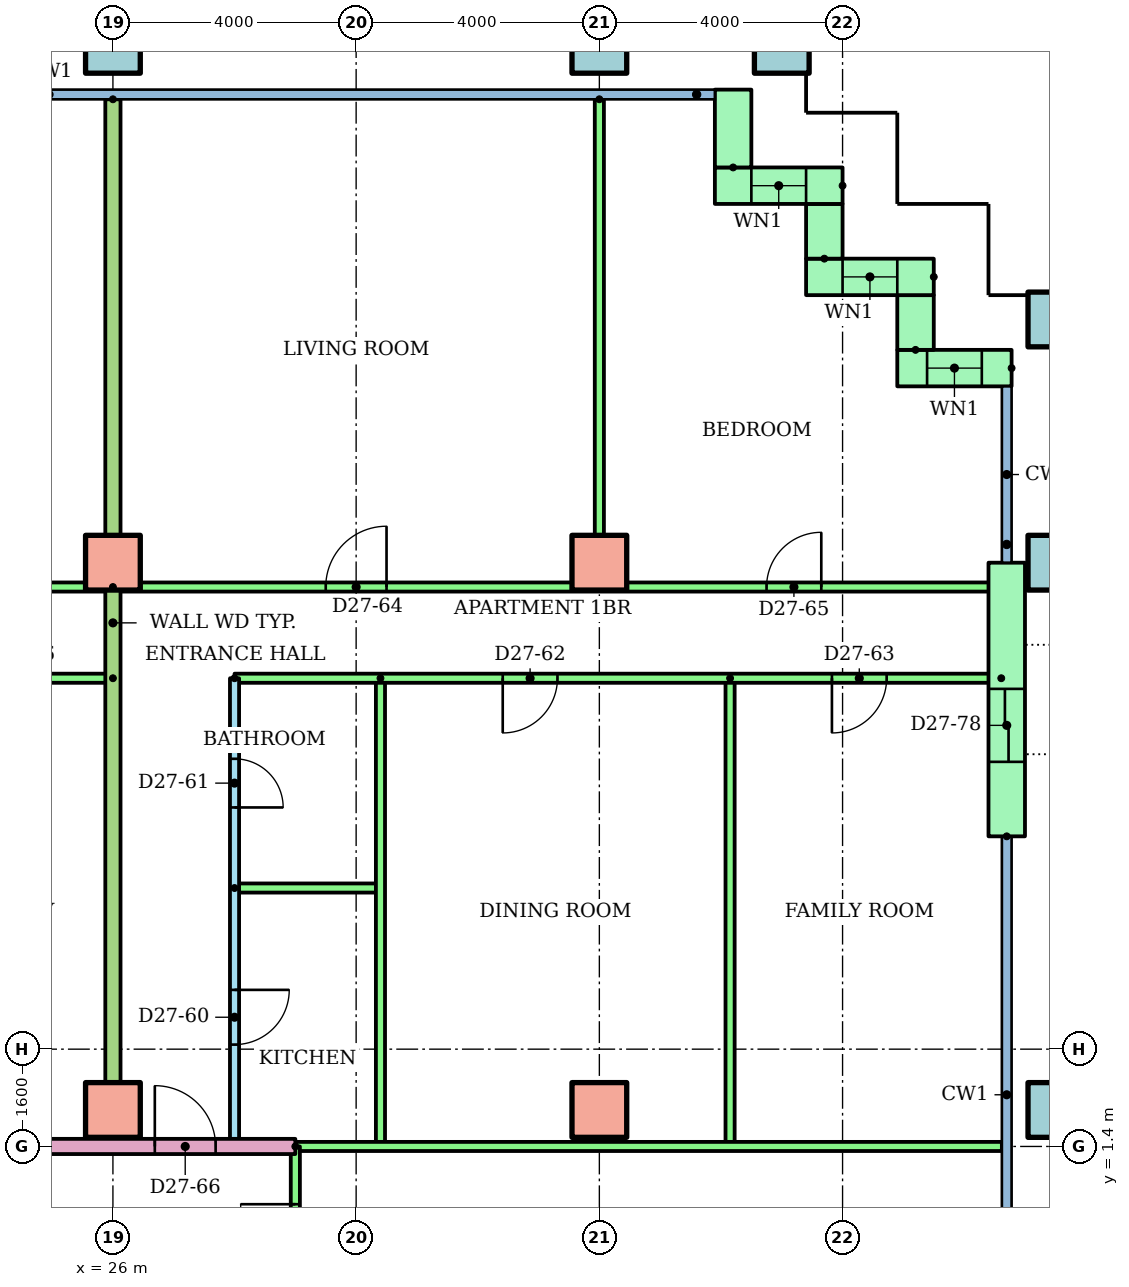
"""IFC4 building model, lengths in metres.
Left out: names, types, materials, properties, quantities, classifications, styles, units other than length and angle.
Written with IfcOpenShell. Run it as: python <this file> out.ifc"""

import sys

from ifc_helpers import new_model, si_unit, direction, frame, frame_2d, origin, origin_2d, place, context, subcontext, project, spatial, rectangle, hollow_rectangle, extrude, element, fill, save


model = new_model("IFC4")
c1 = context("Model", 3, precision=1e-05, world=origin(), true_north=direction((0.0, 1.0)))
c2 = subcontext(c1, "Body", "Model", "MODEL_VIEW")
j1 = project(units=[si_unit("LENGTHUNIT", "METRE"), si_unit("PLANEANGLEUNIT", "RADIAN")], contexts=[c1])
p1 = place(None, origin())
s1 = spatial("IfcSite", under=j1, at=p1, CompositionType="ELEMENT")
p2 = place(p1, origin())
s2 = spatial("IfcBuilding", under=s1, at=p2, CompositionType="ELEMENT")
p3 = place(p2, frame((0.0, 0.0, 103.1)))
s3 = spatial("IfcBuildingStorey", under=s2, at=p3, CompositionType="ELEMENT", Elevation=103.1)
for number, where in (
    (1, (26.0, 2.0, 0.0)),
    (2, (34.0, 2.0, 0.0)),
):
    element("IfcColumn", number, at=place(p3, frame(where)), inside=s3, PredefinedType="COLUMN", context=c2, shape_type="SweptSolid", body=[
        extrude(rectangle(XDim=0.9, YDim=0.9, at=origin_2d()), origin(), (0.0, 0.0, 1.0), 3.2),
    ])
p4 = place(p3, frame((41.5, 2.0, 0.0)))
e3 = element("IfcColumn", 3, at=p4, inside=s3, PredefinedType="COLUMN", context=c2, shape_type="SweptSolid", body=[
    extrude(hollow_rectangle(XDim=0.9, YDim=0.9, WallThickness=0.045, at=origin_2d()), origin(), (0.0, 0.0, 1.0), 3.2),
])
for number, where in (
    (4, (26.0, 11.0, 0.0)),
    (5, (34.0, 11.0, 0.0)),
):
    element("IfcColumn", number, at=place(p3, frame(where)), inside=s3, PredefinedType="COLUMN", context=c2, shape_type="SweptSolid", body=[
        extrude(rectangle(XDim=0.9, YDim=0.9, at=origin_2d()), origin(), (0.0, 0.0, 1.0), 3.2),
    ])
for number, where in (
    (6, (41.5, 11.0, 0.0)),
    (7, (41.5, 15.0, 0.0)),
    (8, (26.0, 19.5, 0.0)),
    (9, (34.0, 19.5, 0.0)),
    (10, (37.0, 19.5, 0.0)),
):
    element("IfcColumn", number, at=place(p3, frame(where)), inside=s3, PredefinedType="COLUMN", context=c2, shape_type="SweptSolid", body=[
        extrude(hollow_rectangle(XDim=0.9, YDim=0.9, WallThickness=0.045, at=origin_2d()), origin(), (0.0, 0.0, 1.0), 3.2),
    ])
p5 = place(p3, frame((40.78, 14.2, 0.0), z_axis=(0.0, 0.0, 1.0), x_axis=(-1.0, 0.0, 0.0)))
e11 = element("IfcWall", 11, at=p5, inside=s3, PredefinedType="STANDARD", context=c2, shape_type="SweptSolid", body=[
    extrude(rectangle(XDim=1.88, YDim=0.6, at=frame_2d((0.94, 0.0))), origin(), (0.0, 0.0, 1.0), 2.8),
])
p6 = place(p5, frame((0.49, 0.0, 0.9)))
e12 = element("IfcOpeningElement", 12, at=p6, cuts=e11, PredefinedType="OPENING", context=c2, shape_type="SweptSolid", body=[
    extrude(rectangle(XDim=0.9, YDim=1.5, at=frame_2d((0.45, 0.75))), frame((0.0, 0.31, 0.0), z_axis=(0.0, -1.0, 0.0), x_axis=(1.0, 0.0, 0.0)), (0.0, 0.0, 1.0), 0.62),
])
p7 = place(p3, frame((39.2, 14.5, 0.0), z_axis=(0.0, 0.0, 1.0), x_axis=(0.0, 1.0, 0.0)))
e13 = element("IfcWall", 13, at=p7, inside=s3, PredefinedType="STANDARD", context=c2, shape_type="SweptSolid", body=[
    extrude(rectangle(XDim=0.9, YDim=0.6, at=frame_2d((0.45, 0.0))), origin(), (0.0, 0.0, 1.0), 2.8),
])
p8 = place(p3, frame((39.5, 15.7, 0.0), z_axis=(0.0, 0.0, 1.0), x_axis=(-1.0, 0.0, 0.0)))
e14 = element("IfcWall", 14, at=p8, inside=s3, PredefinedType="STANDARD", context=c2, shape_type="SweptSolid", body=[
    extrude(rectangle(XDim=2.1, YDim=0.6, at=frame_2d((1.05, 0.0))), origin(), (0.0, 0.0, 1.0), 2.8),
])
p9 = place(p8, frame((0.6, 0.0, 0.9)))
e15 = element("IfcOpeningElement", 15, at=p9, cuts=e14, PredefinedType="OPENING", context=c2, shape_type="SweptSolid", body=[
    extrude(rectangle(XDim=0.9, YDim=1.5, at=frame_2d((0.45, 0.75))), frame((0.0, 0.31, 0.0), z_axis=(0.0, -1.0, 0.0), x_axis=(1.0, 0.0, 0.0)), (0.0, 0.0, 1.0), 0.62),
])
p10 = place(p3, frame((37.7, 16.0, 0.0), z_axis=(0.0, 0.0, 1.0), x_axis=(0.0, 1.0, 0.0)))
e16 = element("IfcWall", 16, at=p10, inside=s3, PredefinedType="STANDARD", context=c2, shape_type="SweptSolid", body=[
    extrude(rectangle(XDim=0.9, YDim=0.6, at=frame_2d((0.45, 0.0))), origin(), (0.0, 0.0, 1.0), 2.8),
])
p11 = place(p3, frame((38.0, 17.2, 0.0), z_axis=(0.0, 0.0, 1.0), x_axis=(-1.0, 0.0, 0.0)))
e17 = element("IfcWall", 17, at=p11, inside=s3, PredefinedType="STANDARD", context=c2, shape_type="SweptSolid", body=[
    extrude(rectangle(XDim=2.1, YDim=0.6, at=frame_2d((1.05, 0.0))), origin(), (0.0, 0.0, 1.0), 2.8),
])
p12 = place(p11, frame((0.6, 0.0, 0.9)))
e18 = element("IfcOpeningElement", 18, at=p12, cuts=e17, PredefinedType="OPENING", context=c2, shape_type="SweptSolid", body=[
    extrude(rectangle(XDim=0.9, YDim=1.5, at=frame_2d((0.45, 0.75))), frame((0.0, 0.31, 0.0), z_axis=(0.0, -1.0, 0.0), x_axis=(1.0, 0.0, 0.0)), (0.0, 0.0, 1.0), 0.62),
])
p13 = place(p3, frame((36.2, 17.5, 0.0), z_axis=(0.0, 0.0, 1.0), x_axis=(0.0, 1.0, 0.0)))
e19 = element("IfcWall", 19, at=p13, inside=s3, PredefinedType="STANDARD", context=c2, shape_type="SweptSolid", body=[
    extrude(rectangle(XDim=1.28, YDim=0.6, at=frame_2d((0.64, 0.0))), origin(), (0.0, 0.0, 1.0), 2.8),
])
p14 = place(p3, frame((40.7, 6.5, 0.0), z_axis=(0.0, 0.0, 1.0), x_axis=(0.0, 1.0, 0.0)))
e20 = element("IfcWall", 20, at=p14, inside=s3, PredefinedType="STANDARD", context=c2, shape_type="SweptSolid", body=[
    extrude(rectangle(XDim=4.5, YDim=0.6, at=frame_2d((2.25, 0.0))), origin(), (0.0, 0.0, 1.0), 2.8),
])
p15 = place(p14, frame((1.225, 0.0, 0.0)))
e21 = element("IfcOpeningElement", 21, at=p15, cuts=e20, PredefinedType="OPENING", context=c2, shape_type="SweptSolid", body=[
    extrude(rectangle(XDim=1.2, YDim=2.1, at=frame_2d((0.6, 1.05))), frame((0.0, 0.31, 0.0), z_axis=(0.0, -1.0, 0.0), x_axis=(1.0, 0.0, 0.0)), (0.0, 0.0, 1.0), 0.62),
])
p16 = place(p3, frame((26.0, 9.1, 0.0), z_axis=(0.0, 0.0, 1.0), x_axis=(-1.0, 0.0, 0.0)))
e22 = element("IfcWall", 22, at=p16, inside=s3, PredefinedType="PARTITIONING", context=c2, shape_type="SweptSolid", body=[
    extrude(rectangle(XDim=10.0, YDim=0.15, at=frame_2d((5.0, 0.0))), origin(), (0.0, 0.0, 1.0), 2.4),
])
p17 = place(p16, frame((4.9, 0.0, 0.0)))
e23 = element("IfcOpeningElement", 23, at=p17, cuts=e22, PredefinedType="OPENING", context=c2, shape_type="SweptSolid", body=[
    extrude(rectangle(XDim=0.9, YDim=2.1, at=frame_2d((0.45, 1.05))), frame((0.0, 0.085, 0.0), z_axis=(0.0, -1.0, 0.0), x_axis=(1.0, 0.0, 0.0)), (0.0, 0.0, 1.0), 0.17),
])
p18 = place(p16, frame((1.1, 0.0, 0.0)))
e24 = element("IfcOpeningElement", 24, at=p18, cuts=e22, PredefinedType="OPENING", context=c2, shape_type="SweptSolid", body=[
    extrude(rectangle(XDim=0.9, YDim=2.1, at=frame_2d((0.45, 1.05))), frame((0.0, 0.085, 0.0), z_axis=(0.0, -1.0, 0.0), x_axis=(1.0, 0.0, 0.0)), (0.0, 0.0, 1.0), 0.17),
])
p19 = place(p3, frame((14.0, 10.6, 0.0)))
e25 = element("IfcWall", 25, at=p19, inside=s3, PredefinedType="PARTITIONING", context=c2, shape_type="SweptSolid", body=[
    extrude(rectangle(XDim=12.0, YDim=0.15, at=frame_2d((6.0, 0.0))), origin(), (0.0, 0.0, 1.0), 2.4),
])
p20 = place(p19, frame((1.5, 0.0, 0.0)))
e26 = element("IfcOpeningElement", 26, at=p20, cuts=e25, PredefinedType="OPENING", context=c2, shape_type="SweptSolid", body=[
    extrude(rectangle(XDim=1.0, YDim=2.1, at=frame_2d((0.5, 1.05))), frame((0.0, 0.085, 0.0), z_axis=(0.0, -1.0, 0.0), x_axis=(1.0, 0.0, 0.0)), (0.0, 0.0, 1.0), 0.17),
])
p21 = place(p19, frame((7.55, 0.0, 0.0)))
e27 = element("IfcOpeningElement", 27, at=p21, cuts=e25, PredefinedType="OPENING", context=c2, shape_type="SweptSolid", body=[
    extrude(rectangle(XDim=0.9, YDim=2.1, at=frame_2d((0.45, 1.05))), frame((0.0, 0.085, 0.0), z_axis=(0.0, -1.0, 0.0), x_axis=(1.0, 0.0, 0.0)), (0.0, 0.0, 1.0), 0.17),
])
p22 = place(p3, frame((28.0, 9.1, 0.0), z_axis=(0.0, 0.0, 1.0), x_axis=(0.0, -1.0, 0.0)))
e28 = element("IfcWall", 28, at=p22, inside=s3, PredefinedType="PARTITIONING", context=c2, shape_type="SweptSolid", body=[
    extrude(rectangle(XDim=7.7, YDim=0.15, at=frame_2d((3.85, 0.0))), origin(), (0.0, 0.0, 1.0), 2.4),
])
p23 = place(p22, frame((5.125, 0.0, 0.0)))
e29 = element("IfcOpeningElement", 29, at=p23, cuts=e28, PredefinedType="OPENING", context=c2, shape_type="SweptSolid", body=[
    extrude(rectangle(XDim=0.9, YDim=2.1, at=frame_2d((0.45, 1.05))), frame((0.0, 0.085, 0.0), z_axis=(0.0, -1.0, 0.0), x_axis=(1.0, 0.0, 0.0)), (0.0, 0.0, 1.0), 0.17),
])
p24 = place(p22, frame((1.325, 0.0, 0.0)))
e30 = element("IfcOpeningElement", 30, at=p24, cuts=e28, PredefinedType="OPENING", context=c2, shape_type="SweptSolid", body=[
    extrude(rectangle(XDim=0.8, YDim=2.1, at=frame_2d((0.4, 1.05))), frame((0.0, 0.085, 0.0), z_axis=(0.0, -1.0, 0.0), x_axis=(1.0, 0.0, 0.0)), (0.0, 0.0, 1.0), 0.17),
])
p25 = place(p3, frame((28.0, 5.65, 0.0)))
e31 = element("IfcWall", 31, at=p25, inside=s3, PredefinedType="PARTITIONING", context=c2, shape_type="SweptSolid", body=[
    extrude(rectangle(XDim=2.4, YDim=0.15, at=frame_2d((1.2, 0.0))), origin(), (0.0, 0.0, 1.0), 2.4),
])
for number, where, z_axis, x_axis in (
    (32, (30.4, 9.1, 0.0), (0.0, 0.0, 1.0), (0.0, -1.0, 0.0)),
    (33, (36.15, 9.1, 0.0), (0.0, 0.0, 1.0), (0.0, -1.0, 0.0)),
):
    element("IfcWall", number, at=place(p3, frame(where, z_axis=z_axis, x_axis=x_axis)), inside=s3, PredefinedType="PARTITIONING", context=c2, shape_type="SweptSolid", body=[
        extrude(rectangle(XDim=7.7, YDim=0.15, at=frame_2d((3.85, 0.0))), origin(), (0.0, 0.0, 1.0), 2.4),
    ])
p26 = place(p3, frame((40.61, 9.1, 0.0), z_axis=(0.0, 0.0, 1.0), x_axis=(-1.0, 0.0, 0.0)))
e34 = element("IfcWall", 34, at=p26, inside=s3, PredefinedType="PARTITIONING", context=c2, shape_type="SweptSolid", body=[
    extrude(rectangle(XDim=12.61, YDim=0.15, at=frame_2d((6.305, 0.0))), origin(), (0.0, 0.0, 1.0), 2.4),
])
p27 = place(p26, frame((7.299, 0.0, 0.0)))
e35 = element("IfcOpeningElement", 35, at=p27, cuts=e34, PredefinedType="OPENING", context=c2, shape_type="SweptSolid", body=[
    extrude(rectangle(XDim=0.9, YDim=2.1, at=frame_2d((0.45, 1.05))), frame((0.0, 0.085, 0.0), z_axis=(0.0, -1.0, 0.0), x_axis=(1.0, 0.0, 0.0)), (0.0, 0.0, 1.0), 0.17),
])
p28 = place(p26, frame((1.885, 0.0, 0.0)))
e36 = element("IfcOpeningElement", 36, at=p28, cuts=e34, PredefinedType="OPENING", context=c2, shape_type="SweptSolid", body=[
    extrude(rectangle(XDim=0.9, YDim=2.1, at=frame_2d((0.45, 1.05))), frame((0.0, 0.085, 0.0), z_axis=(0.0, -1.0, 0.0), x_axis=(1.0, 0.0, 0.0)), (0.0, 0.0, 1.0), 0.17),
])
p29 = place(p3, frame((26.0, 10.6, 0.0)))
e37 = element("IfcWall", 37, at=p29, inside=s3, PredefinedType="PARTITIONING", context=c2, shape_type="SweptSolid", body=[
    extrude(rectangle(XDim=14.61, YDim=0.15, at=frame_2d((7.305, 0.0))), origin(), (0.0, 0.0, 1.0), 2.4),
])
p30 = place(p29, frame((3.5, 0.0, 0.0)))
e38 = element("IfcOpeningElement", 38, at=p30, cuts=e37, PredefinedType="OPENING", context=c2, shape_type="SweptSolid", body=[
    extrude(rectangle(XDim=1.0, YDim=2.1, at=frame_2d((0.5, 1.05))), frame((0.0, 0.085, 0.0), z_axis=(0.0, -1.0, 0.0), x_axis=(1.0, 0.0, 0.0)), (0.0, 0.0, 1.0), 0.17),
])
p31 = place(p29, frame((10.75, 0.0, 0.0)))
e39 = element("IfcOpeningElement", 39, at=p31, cuts=e37, PredefinedType="OPENING", context=c2, shape_type="SweptSolid", body=[
    extrude(rectangle(XDim=0.9, YDim=2.1, at=frame_2d((0.45, 1.05))), frame((0.0, 0.085, 0.0), z_axis=(0.0, -1.0, 0.0), x_axis=(1.0, 0.0, 0.0)), (0.0, 0.0, 1.0), 0.17),
])
p32 = place(p3, frame((34.0, 18.621, 0.0), z_axis=(0.0, 0.0, 1.0), x_axis=(0.0, -1.0, 0.0)))
e40 = element("IfcWall", 40, at=p32, inside=s3, PredefinedType="PARTITIONING", context=c2, shape_type="SweptSolid", body=[
    extrude(rectangle(XDim=8.021, YDim=0.15, at=frame_2d((4.01, 0.0))), origin(), (0.0, 0.0, 1.0), 2.4),
])
p33 = place(p3, frame((26.0, 18.621, 0.0), z_axis=(0.0, 0.0, 1.0), x_axis=(0.0, -1.0, 0.0)))
e41 = element("IfcWall", 41, at=p33, inside=s3, PredefinedType="PARTITIONING", context=c2, shape_type="SweptSolid", body=[
    extrude(rectangle(XDim=17.221, YDim=0.25, at=frame_2d((8.611, 0.0))), origin(), (0.0, 0.0, 1.0), 2.4),
])
p34 = place(p3, frame((14.0, 1.4, 0.0)))
e42 = element("IfcWall", 42, at=p34, inside=s3, PredefinedType="PARTITIONING", context=c2, shape_type="SweptSolid", body=[
    extrude(rectangle(XDim=15.0, YDim=0.25, at=frame_2d((7.5, 0.0))), origin(), (0.0, 0.0, 1.0), 2.4),
])
p35 = place(p34, frame((0.5, 0.0, 0.0)))
e43 = element("IfcOpeningElement", 43, at=p35, cuts=e42, PredefinedType="OPENING", context=c2, shape_type="SweptSolid", body=[
    extrude(rectangle(XDim=1.0, YDim=2.1, at=frame_2d((0.5, 1.05))), frame((0.0, 0.135, 0.0), z_axis=(0.0, -1.0, 0.0), x_axis=(1.0, 0.0, 0.0)), (0.0, 0.0, 1.0), 0.27),
])
p36 = place(p34, frame((12.689, 0.0, 0.0)))
e44 = element("IfcOpeningElement", 44, at=p36, cuts=e42, PredefinedType="OPENING", context=c2, shape_type="SweptSolid", body=[
    extrude(rectangle(XDim=1.0, YDim=2.1, at=frame_2d((0.5, 1.05))), frame((0.0, 0.135, 0.0), z_axis=(0.0, -1.0, 0.0), x_axis=(1.0, 0.0, 0.0)), (0.0, 0.0, 1.0), 0.27),
])
p37 = place(p3, frame((29.0, 1.4, 0.0)))
e45 = element("IfcWall", 45, at=p37, inside=s3, PredefinedType="PARTITIONING", context=c2, shape_type="SweptSolid", body=[
    extrude(rectangle(XDim=11.62, YDim=0.15, at=frame_2d((5.81, 0.0))), origin(), (0.0, 0.0, 1.0), 2.4),
])
p38 = place(p3, frame((29.0, -1.4, 0.0), z_axis=(0.0, 0.0, 1.0), x_axis=(0.0, 1.0, 0.0)))
e46 = element("IfcWall", 46, at=p38, inside=s3, PredefinedType="PARTITIONING", context=c2, shape_type="SweptSolid", body=[
    extrude(rectangle(XDim=2.8, YDim=0.15, at=frame_2d((1.4, 0.0))), origin(), (0.0, 0.0, 1.0), 2.4),
])
p39 = place(p38, frame((0.95, 0.0, 0.0)))
e47 = element("IfcOpeningElement", 47, at=p39, cuts=e46, PredefinedType="OPENING", context=c2, shape_type="SweptSolid", body=[
    extrude(rectangle(XDim=0.9, YDim=2.1, at=frame_2d((0.45, 1.05))), frame((0.0, 0.085, 0.0), z_axis=(0.0, -1.0, 0.0), x_axis=(1.0, 0.0, 0.0)), (0.0, 0.0, 1.0), 0.17),
])
p40 = place(p6, origin())
e48 = element("IfcWindow", 48, at=p40, inside=s3, PartitioningType="SINGLE_PANEL", PredefinedType="WINDOW", context=c2, shape_type="SweptSolid", body=[
    extrude(rectangle(XDim=0.9, YDim=1.5, at=frame_2d((0.45, 0.75))), frame((0.0, 0.03, 0.0), z_axis=(0.0, -1.0, 0.0), x_axis=(1.0, 0.0, 0.0)), (0.0, 0.0, 1.0), 0.06),
])
fill(e12, e48)
p41 = place(p9, origin())
e49 = element("IfcWindow", 49, at=p41, inside=s3, PartitioningType="SINGLE_PANEL", PredefinedType="WINDOW", context=c2, shape_type="SweptSolid", body=[
    extrude(rectangle(XDim=0.9, YDim=1.5, at=frame_2d((0.45, 0.75))), frame((0.0, 0.03, 0.0), z_axis=(0.0, -1.0, 0.0), x_axis=(1.0, 0.0, 0.0)), (0.0, 0.0, 1.0), 0.06),
])
fill(e15, e49)
p42 = place(p12, origin())
e50 = element("IfcWindow", 50, at=p42, inside=s3, PartitioningType="SINGLE_PANEL", PredefinedType="WINDOW", context=c2, shape_type="SweptSolid", body=[
    extrude(rectangle(XDim=0.9, YDim=1.5, at=frame_2d((0.45, 0.75))), frame((0.0, 0.03, 0.0), z_axis=(0.0, -1.0, 0.0), x_axis=(1.0, 0.0, 0.0)), (0.0, 0.0, 1.0), 0.06),
])
fill(e18, e50)
p43 = place(p23, origin())
e51 = element("IfcDoor", 51, at=p43, inside=s3, OperationType="SINGLE_SWING_LEFT", PredefinedType="DOOR", context=c2, shape_type="SweptSolid", body=[
    extrude(rectangle(XDim=0.9, YDim=2.1, at=frame_2d((0.45, 1.05))), frame((0.0, 0.025, 0.0), z_axis=(0.0, -1.0, 0.0), x_axis=(1.0, 0.0, 0.0)), (0.0, 0.0, 1.0), 0.05),
])
fill(e29, e51)
p44 = place(p24, origin())
e52 = element("IfcDoor", 52, at=p44, inside=s3, OperationType="SINGLE_SWING_RIGHT", PredefinedType="DOOR", context=c2, shape_type="SweptSolid", body=[
    extrude(rectangle(XDim=0.8, YDim=2.1, at=frame_2d((0.4, 1.05))), frame((0.0, 0.025, 0.0), z_axis=(0.0, -1.0, 0.0), x_axis=(1.0, 0.0, 0.0)), (0.0, 0.0, 1.0), 0.05),
])
fill(e30, e52)
p45 = place(p27, origin())
e53 = element("IfcDoor", 53, at=p45, inside=s3, OperationType="SINGLE_SWING_RIGHT", PredefinedType="DOOR", context=c2, shape_type="SweptSolid", body=[
    extrude(rectangle(XDim=0.9, YDim=2.1, at=frame_2d((0.45, 1.05))), frame((0.0, 0.025, 0.0), z_axis=(0.0, -1.0, 0.0), x_axis=(1.0, 0.0, 0.0)), (0.0, 0.0, 1.0), 0.05),
])
fill(e35, e53)
p46 = place(p28, origin())
e54 = element("IfcDoor", 54, at=p46, inside=s3, OperationType="SINGLE_SWING_RIGHT", PredefinedType="DOOR", context=c2, shape_type="SweptSolid", body=[
    extrude(rectangle(XDim=0.9, YDim=2.1, at=frame_2d((0.45, 1.05))), frame((0.0, 0.025, 0.0), z_axis=(0.0, -1.0, 0.0), x_axis=(1.0, 0.0, 0.0)), (0.0, 0.0, 1.0), 0.05),
])
fill(e36, e54)
p47 = place(p30, origin())
e55 = element("IfcDoor", 55, at=p47, inside=s3, OperationType="SINGLE_SWING_RIGHT", PredefinedType="DOOR", context=c2, shape_type="SweptSolid", body=[
    extrude(rectangle(XDim=1.0, YDim=2.1, at=frame_2d((0.5, 1.05))), frame((0.0, 0.025, 0.0), z_axis=(0.0, -1.0, 0.0), x_axis=(1.0, 0.0, 0.0)), (0.0, 0.0, 1.0), 0.05),
])
fill(e38, e55)
p48 = place(p31, origin())
e56 = element("IfcDoor", 56, at=p48, inside=s3, OperationType="SINGLE_SWING_RIGHT", PredefinedType="DOOR", context=c2, shape_type="SweptSolid", body=[
    extrude(rectangle(XDim=0.9, YDim=2.1, at=frame_2d((0.45, 1.05))), frame((0.0, 0.025, 0.0), z_axis=(0.0, -1.0, 0.0), x_axis=(1.0, 0.0, 0.0)), (0.0, 0.0, 1.0), 0.05),
])
fill(e39, e56)
p49 = place(p36, origin())
e57 = element("IfcDoor", 57, at=p49, inside=s3, OperationType="SINGLE_SWING_LEFT", PredefinedType="DOOR", context=c2, shape_type="SweptSolid", body=[
    extrude(rectangle(XDim=1.0, YDim=2.1, at=frame_2d((0.5, 1.05))), frame((0.0, 0.025, 0.0), z_axis=(0.0, -1.0, 0.0), x_axis=(1.0, 0.0, 0.0)), (0.0, 0.0, 1.0), 0.05),
])
fill(e44, e57)
p50 = place(p39, origin())
e58 = element("IfcDoor", 58, at=p50, inside=s3, OperationType="SINGLE_SWING_RIGHT", PredefinedType="DOOR", context=c2, shape_type="SweptSolid", body=[
    extrude(rectangle(XDim=0.9, YDim=2.1, at=frame_2d((0.45, 1.05))), frame((0.0, 0.025, 0.0), z_axis=(0.0, -1.0, 0.0), x_axis=(1.0, 0.0, 0.0)), (0.0, 0.0, 1.0), 0.05),
])
fill(e47, e58)
p51 = place(p15, origin())
e59 = element("IfcDoor", 59, at=p51, inside=s3, OperationType="SLIDING_TO_LEFT", PredefinedType="DOOR", context=c2, shape_type="SweptSolid", body=[
    extrude(rectangle(XDim=1.2, YDim=2.1, at=frame_2d((0.6, 1.05))), frame((0.0, 0.025, 0.0), z_axis=(0.0, -1.0, 0.0), x_axis=(1.0, 0.0, 0.0)), (0.0, 0.0, 1.0), 0.05),
])
fill(e21, e59)
save(model, sys.argv[1])
